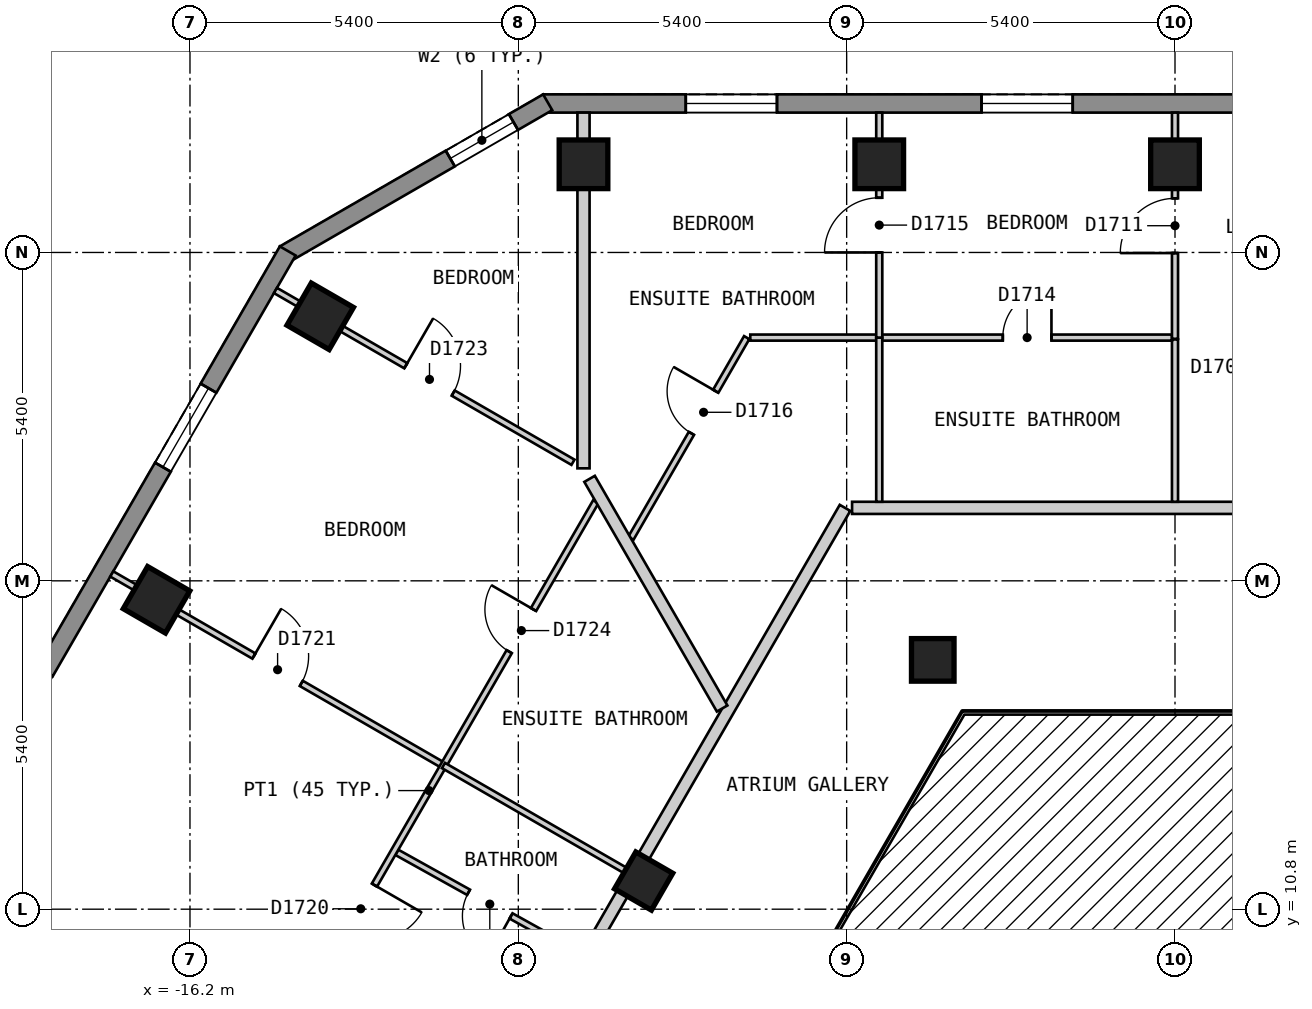
"""IFC4 building model, lengths in metres.
Left out: names, types, materials, properties, quantities, classifications, styles, units other than length and angle.
Written with IfcOpenShell. Run it as: python <this file> out.ifc"""

import sys

from ifc_helpers import new_model, si_unit, direction, frame, frame_2d, origin, origin_2d, place, context, subcontext, project, spatial, polyline, rectangle, outline, extrude, element, fill, save


model = new_model("IFC4")
c1 = context("Model", 3, precision=1e-05, world=origin(), true_north=direction((0.0, 1.0)))
c2 = subcontext(c1, "Body", "Model", "MODEL_VIEW")
j1 = project(units=[si_unit("LENGTHUNIT", "METRE"), si_unit("PLANEANGLEUNIT", "RADIAN")], contexts=[c1])
p1 = place(None, origin())
s1 = spatial("IfcSite", under=j1, at=p1, CompositionType="ELEMENT")
p2 = place(p1, origin())
s2 = spatial("IfcBuilding", under=s1, at=p2, CompositionType="ELEMENT")
p3 = place(p2, frame((0.0, 0.0, 181.2)))
s3 = spatial("IfcBuildingStorey", under=s2, at=p3, CompositionType="ELEMENT", Elevation=181.2)
for number, where, z_axis, x_axis in (
    (1, (0.0, 23.05, 0.0), (0.0, 0.0, 1.0), (-1.0, 0.0, 0.0)),
    (2, (-4.864, 23.05, 0.0), (0.0, 0.0, 1.0), (-1.0, 0.0, 0.0)),
    (3, (-9.728, 23.05, 0.0), (0.0, 0.0, 1.0), (-1.0, 0.0, 0.0)),
    (4, (-14.058, 20.55, 0.0), (0.0, 0.0, 1.0), (-0.5, -0.866, 0.0)),
    (5, (-16.75, 15.888, 0.0), (0.0, 0.0, 1.0), (-0.5, -0.866, 0.0)),
):
    element("IfcColumn", number, at=place(p3, frame(where, z_axis=z_axis, x_axis=x_axis)), inside=s3, PredefinedType="COLUMN", context=c2, shape_type="SweptSolid", body=[
        extrude(rectangle(XDim=0.8, YDim=0.8, at=origin_2d()), origin(), (0.0, 0.0, 1.0), 3.0),
    ])
for number, where, z_axis, x_axis in (
    (6, (-3.984, 14.9, 0.0), (0.0, 0.0, 1.0), (1.0, 0.0, 0.0)),
    (7, (-8.739, 11.263, 0.0), (0.0, 0.0, 1.0), (-0.5, -0.866, 0.0)),
):
    element("IfcColumn", number, at=place(p3, frame(where, z_axis=z_axis, x_axis=x_axis)), inside=s3, PredefinedType="COLUMN", context=c2, shape_type="SweptSolid", body=[
        extrude(rectangle(XDim=0.7, YDim=0.7, at=origin_2d()), origin(), (0.0, 0.0, 1.0), 3.0),
    ])
p4 = place(p3, frame((10.392, 24.05, 0.0), z_axis=(0.0, 0.0, 1.0), x_axis=(-1.0, 0.0, 0.0)))
e8 = element("IfcWall", 8, at=p4, inside=s3, PredefinedType="SOLIDWALL", context=c2, shape_type="SweptSolid", body=[
    extrude(outline(polyline([(0.0, -0.15), (20.784, -0.15), (20.704, 0.15), (0.08, 0.15), (0.0, -0.15)])), origin(), (0.0, 0.0, 1.0), 2.7),
])
p5 = place(p4, frame((2.346, 0.0, 0.15)))
e9 = element("IfcOpeningElement", 9, at=p5, cuts=e8, PredefinedType="OPENING", context=c2, shape_type="SweptSolid", body=[
    extrude(rectangle(XDim=1.5, YDim=2.1, at=frame_2d((0.75, 1.05))), frame((0.0, 0.16, 0.0), z_axis=(0.0, -1.0, 0.0), x_axis=(1.0, 0.0, 0.0)), (0.0, 0.0, 1.0), 0.32),
])
p6 = place(p4, frame((7.21, 0.0, 0.15)))
e10 = element("IfcOpeningElement", 10, at=p6, cuts=e8, PredefinedType="OPENING", context=c2, shape_type="SweptSolid", body=[
    extrude(rectangle(XDim=1.5, YDim=2.1, at=frame_2d((0.75, 1.05))), frame((0.0, 0.16, 0.0), z_axis=(0.0, -1.0, 0.0), x_axis=(1.0, 0.0, 0.0)), (0.0, 0.0, 1.0), 0.32),
])
p7 = place(p4, frame((12.074, 0.0, 0.15)))
e11 = element("IfcOpeningElement", 11, at=p7, cuts=e8, PredefinedType="OPENING", context=c2, shape_type="SweptSolid", body=[
    extrude(rectangle(XDim=1.5, YDim=2.1, at=frame_2d((0.75, 1.05))), frame((0.0, 0.16, 0.0), z_axis=(0.0, -1.0, 0.0), x_axis=(1.0, 0.0, 0.0)), (0.0, 0.0, 1.0), 0.32),
])
p8 = place(p4, frame((16.938, 0.0, 0.15)))
e12 = element("IfcOpeningElement", 12, at=p8, cuts=e8, PredefinedType="OPENING", context=c2, shape_type="SweptSolid", body=[
    extrude(rectangle(XDim=1.5, YDim=2.1, at=frame_2d((0.75, 1.05))), frame((0.0, 0.16, 0.0), z_axis=(0.0, -1.0, 0.0), x_axis=(1.0, 0.0, 0.0)), (0.0, 0.0, 1.0), 0.32),
])
p9 = place(p3, frame((-10.317, 24.07, 0.0), z_axis=(0.0, 0.0, 1.0), x_axis=(-0.866022959057, -0.500004234368, 0.0)))
e13 = element("IfcWall", 13, at=p9, inside=s3, PredefinedType="SOLIDWALL", context=c2, shape_type="SweptSolid", body=[
    extrude(outline(polyline([(0.0, -0.15), (5.0, -0.15), (4.92, 0.15), (0.08, 0.15), (0.0, -0.15)])), origin(), (0.0, 0.0, 1.0), 2.7),
])
p10 = place(p9, frame((0.65, 0.0, 0.15)))
e14 = element("IfcOpeningElement", 14, at=p10, cuts=e13, PredefinedType="OPENING", context=c2, shape_type="SweptSolid", body=[
    extrude(rectangle(XDim=1.2, YDim=2.1, at=frame_2d((0.6, 1.05))), frame((0.0, 0.16, 0.0), z_axis=(0.0, -1.0, 0.0), x_axis=(1.0, 0.0, 0.0)), (0.0, 0.0, 1.0), 0.32),
])
p11 = place(p3, frame((-14.592, 21.625, 0.0), z_axis=(0.0, 0.0, 1.0), x_axis=(-0.500010537973, -0.866019319597, 0.0)))
e15 = element("IfcWall", 15, at=p11, inside=s3, PredefinedType="SOLIDWALL", context=c2, shape_type="SweptSolid", body=[
    extrude(outline(polyline([(0.0, -0.15), (22.863, -0.15), (22.783, 0.15), (0.08, 0.15), (0.0, -0.15)])), origin(), (0.0, 0.0, 1.0), 2.7),
])
p12 = place(p11, frame((2.606, 0.0, 0.15)))
e16 = element("IfcOpeningElement", 16, at=p12, cuts=e15, PredefinedType="OPENING", context=c2, shape_type="SweptSolid", body=[
    extrude(rectangle(XDim=1.5, YDim=2.1, at=frame_2d((0.75, 1.05))), frame((0.0, 0.16, 0.0), z_axis=(0.0, -1.0, 0.0), x_axis=(1.0, 0.0, 0.0)), (0.0, 0.0, 1.0), 0.32),
])
p13 = place(p11, frame((7.99, 0.0, 0.15)))
e17 = element("IfcOpeningElement", 17, at=p13, cuts=e15, PredefinedType="OPENING", context=c2, shape_type="SweptSolid", body=[
    extrude(rectangle(XDim=1.5, YDim=2.1, at=frame_2d((0.75, 1.05))), frame((0.0, 0.16, 0.0), z_axis=(0.0, -1.0, 0.0), x_axis=(1.0, 0.0, 0.0)), (0.0, 0.0, 1.0), 0.32),
])
p14 = place(p11, frame((13.373, 0.0, 0.15)))
e18 = element("IfcOpeningElement", 18, at=p14, cuts=e15, PredefinedType="OPENING", context=c2, shape_type="SweptSolid", body=[
    extrude(rectangle(XDim=1.5, YDim=2.1, at=frame_2d((0.75, 1.05))), frame((0.0, 0.16, 0.0), z_axis=(0.0, -1.0, 0.0), x_axis=(1.0, 0.0, 0.0)), (0.0, 0.0, 1.0), 0.32),
])
p15 = place(p11, frame((18.758, 0.0, 0.15)))
e19 = element("IfcOpeningElement", 19, at=p15, cuts=e15, PredefinedType="OPENING", context=c2, shape_type="SweptSolid", body=[
    extrude(rectangle(XDim=1.5, YDim=2.1, at=frame_2d((0.75, 1.05))), frame((0.0, 0.16, 0.0), z_axis=(0.0, -1.0, 0.0), x_axis=(1.0, 0.0, 0.0)), (0.0, 0.0, 1.0), 0.32),
])
p16 = place(p3, frame((-5.311, 17.4, 0.0), z_axis=(0.0, 0.0, 1.0), x_axis=(1.0, 0.0, 0.0)))
e20 = element("IfcWall", 20, at=p16, inside=s3, PredefinedType="PARTITIONING", context=c2, shape_type="SweptSolid", body=[
    extrude(rectangle(XDim=10.737, YDim=0.2, at=frame_2d((5.369, 0.0))), origin(), (0.0, 0.0, 1.0), 2.7),
])
p17 = place(p16, frame((7.243, 0.0, 0.0)))
e21 = element("IfcOpeningElement", 21, at=p17, cuts=e20, PredefinedType="OPENING", context=c2, shape_type="SweptSolid", body=[
    extrude(rectangle(XDim=0.9, YDim=2.1, at=frame_2d((0.45, 1.05))), frame((0.0, 0.11, 0.0), z_axis=(0.0, -1.0, 0.0), x_axis=(1.0, 0.0, 0.0)), (0.0, 0.0, 1.0), 0.22),
])
p18 = place(p3, frame((-10.771, 8.145, 0.0), z_axis=(0.0, 0.0, 1.0), x_axis=(0.500048075867, 0.865997645391, 0.0)))
e22 = element("IfcWall", 22, at=p18, inside=s3, PredefinedType="PARTITIONING", context=c2, shape_type="SweptSolid", body=[
    extrude(rectangle(XDim=10.687, YDim=0.2, at=frame_2d((5.344, 0.0))), origin(), (0.0, 0.0, 1.0), 2.7),
])
p19 = place(p18, frame((0.549, 0.0, 0.0)))
e23 = element("IfcOpeningElement", 23, at=p19, cuts=e22, PredefinedType="OPENING", context=c2, shape_type="SweptSolid", body=[
    extrude(rectangle(XDim=1.0, YDim=2.1, at=frame_2d((0.5, 1.05))), frame((0.0, 0.11, 0.0), z_axis=(0.0, -1.0, 0.0), x_axis=(1.0, 0.0, 0.0)), (0.0, 0.0, 1.0), 0.22),
])
p20 = place(p3, frame((0.0, 20.17, 0.0), z_axis=(0.0, 0.0, 1.0), x_axis=(0.0, -1.0, 0.0)))
e24 = element("IfcWall", 24, at=p20, inside=s3, PredefinedType="PARTITIONING", context=c2, shape_type="SweptSolid", body=[
    extrude(rectangle(XDim=2.67, YDim=0.1, at=frame_2d((1.335, 0.0))), origin(), (0.0, 0.0, 1.0), 2.7),
])
p21 = place(p3, frame((-12.798, 11.735, 0.0), z_axis=(0.0, 0.0, 1.0), x_axis=(0.873649600774, -0.486555623816, 0.0)))
e25 = element("IfcWall", 25, at=p21, inside=s3, PredefinedType="PARTITIONING", context=c2, shape_type="SweptSolid", body=[
    extrude(rectangle(XDim=3.451, YDim=0.1, at=frame_2d((1.726, 0.0))), origin(), (0.0, 0.0, 1.0), 2.7),
])
p22 = place(p21, frame((1.35, 0.0, 0.0)))
e26 = element("IfcOpeningElement", 26, at=p22, cuts=e25, PredefinedType="OPENING", context=c2, shape_type="SweptSolid", body=[
    extrude(rectangle(XDim=0.8, YDim=2.1, at=frame_2d((0.4, 1.05))), frame((0.0, 0.06, 0.0), z_axis=(0.0, -1.0, 0.0), x_axis=(1.0, 0.0, 0.0)), (0.0, 0.0, 1.0), 0.12),
])
p23 = place(p3, frame((-17.486, 16.313, 0.0), z_axis=(0.0, 0.0, 1.0), x_axis=(0.865997114097, -0.500048995975, 0.0)))
e27 = element("IfcWall", 27, at=p23, inside=s3, PredefinedType="PARTITIONING", context=c2, shape_type="SweptSolid", body=[
    extrude(rectangle(XDim=6.299, YDim=0.1, at=frame_2d((3.149, 0.0))), origin(), (0.0, 0.0, 1.0), 2.7),
])
p24 = place(p23, frame((2.699, 0.0, 0.0)))
e28 = element("IfcOpeningElement", 28, at=p24, cuts=e27, PredefinedType="OPENING", context=c2, shape_type="SweptSolid", body=[
    extrude(rectangle(XDim=0.9, YDim=2.1, at=frame_2d((0.45, 1.05))), frame((0.0, 0.06, 0.0), z_axis=(0.0, -1.0, 0.0), x_axis=(1.0, 0.0, 0.0)), (0.0, 0.0, 1.0), 0.12),
])
p25 = place(p3, frame((-14.794, 20.975, 0.0), z_axis=(0.0, 0.0, 1.0), x_axis=(0.866011447264, -0.500024172624, 0.0)))
e29 = element("IfcWall", 29, at=p25, inside=s3, PredefinedType="PARTITIONING", context=c2, shape_type="SweptSolid", body=[
    extrude(rectangle(XDim=5.65, YDim=0.1, at=frame_2d((2.825, 0.0))), origin(), (0.0, 0.0, 1.0), 2.7),
])
p26 = place(p25, frame((2.475, 0.0, 0.0)))
e30 = element("IfcOpeningElement", 30, at=p26, cuts=e29, PredefinedType="OPENING", context=c2, shape_type="SweptSolid", body=[
    extrude(rectangle(XDim=0.9, YDim=2.1, at=frame_2d((0.45, 1.05))), frame((0.0, 0.06, 0.0), z_axis=(0.0, -1.0, 0.0), x_axis=(1.0, 0.0, 0.0)), (0.0, 0.0, 1.0), 0.12),
])
p27 = place(p3, frame((-6.985, 20.2, 0.0), z_axis=(0.0, 0.0, 1.0), x_axis=(1.0, 0.0, 0.0)))
e31 = element("IfcWall", 31, at=p27, inside=s3, PredefinedType="PARTITIONING", context=c2, shape_type="SweptSolid", body=[
    extrude(rectangle(XDim=6.935, YDim=0.1, at=frame_2d((3.468, 0.0))), origin(), (0.0, 0.0, 1.0), 2.7),
])
p28 = place(p27, frame((4.153, 0.0, 0.0)))
e32 = element("IfcOpeningElement", 32, at=p28, cuts=e31, PredefinedType="OPENING", context=c2, shape_type="SweptSolid", body=[
    extrude(rectangle(XDim=0.8, YDim=2.1, at=frame_2d((0.4, 1.05))), frame((0.0, 0.06, 0.0), z_axis=(0.0, -1.0, 0.0), x_axis=(1.0, 0.0, 0.0)), (0.0, 0.0, 1.0), 0.12),
])
p29 = place(p3, frame((-8.949, 16.9, 0.0), z_axis=(0.0, 0.0, 1.0), x_axis=(0.499949850951, 0.866054355415, 0.0)))
e33 = element("IfcWall", 33, at=p29, inside=s3, PredefinedType="PARTITIONING", context=c2, shape_type="SweptSolid", body=[
    extrude(rectangle(XDim=3.811, YDim=0.1, at=frame_2d((1.905, 0.0))), origin(), (0.0, 0.0, 1.0), 2.7),
])
p30 = place(p29, frame((1.992, 0.0, 0.0)))
e34 = element("IfcOpeningElement", 34, at=p30, cuts=e33, PredefinedType="OPENING", context=c2, shape_type="SweptSolid", body=[
    extrude(rectangle(XDim=0.8, YDim=2.1, at=frame_2d((0.4, 1.05))), frame((0.0, 0.06, 0.0), z_axis=(0.0, -1.0, 0.0), x_axis=(1.0, 0.0, 0.0)), (0.0, 0.0, 1.0), 0.12),
])
p31 = place(p3, frame((-15.012, 8.0, 0.0), z_axis=(0.0, 0.0, 1.0), x_axis=(0.500047346826, 0.865998066356, 0.0)))
e35 = element("IfcWall", 35, at=p31, inside=s3, PredefinedType="PARTITIONING", context=c2, shape_type="SweptSolid", body=[
    extrude(rectangle(XDim=10.971, YDim=0.1, at=frame_2d((5.486, 0.0))), origin(), (0.0, 0.0, 1.0), 2.7),
])
p32 = place(p31, frame((2.791, 0.0, 0.0)))
e36 = element("IfcOpeningElement", 36, at=p32, cuts=e35, PredefinedType="OPENING", context=c2, shape_type="SweptSolid", body=[
    extrude(rectangle(XDim=0.9, YDim=2.1, at=frame_2d((0.45, 1.05))), frame((0.0, 0.06, 0.0), z_axis=(0.0, -1.0, 0.0), x_axis=(1.0, 0.0, 0.0)), (0.0, 0.0, 1.0), 0.12),
])
p33 = place(p31, frame((8.124, 0.0, 0.0)))
e37 = element("IfcOpeningElement", 37, at=p33, cuts=e35, PredefinedType="OPENING", context=c2, shape_type="SweptSolid", body=[
    extrude(rectangle(XDim=0.8, YDim=2.1, at=frame_2d((0.4, 1.05))), frame((0.0, 0.06, 0.0), z_axis=(0.0, -1.0, 0.0), x_axis=(1.0, 0.0, 0.0)), (0.0, 0.0, 1.0), 0.12),
])
p34 = place(p3, frame((0.0, 20.18, 0.0), z_axis=(0.0, 0.0, 1.0), x_axis=(0.0, 1.0, 0.0)))
e38 = element("IfcWall", 38, at=p34, inside=s3, PredefinedType="PARTITIONING", context=c2, shape_type="SweptSolid", body=[
    extrude(rectangle(XDim=3.72, YDim=0.1, at=frame_2d((1.86, 0.0))), origin(), (0.0, 0.0, 1.0), 2.7),
])
p35 = place(p34, frame((1.41, 0.0, 0.0)))
e39 = element("IfcOpeningElement", 39, at=p35, cuts=e38, PredefinedType="OPENING", context=c2, shape_type="SweptSolid", body=[
    extrude(rectangle(XDim=0.9, YDim=2.1, at=frame_2d((0.45, 1.05))), frame((0.0, 0.06, 0.0), z_axis=(0.0, -1.0, 0.0), x_axis=(1.0, 0.0, 0.0)), (0.0, 0.0, 1.0), 0.12),
])
p36 = place(p3, frame((-4.864, 17.5, 0.0), z_axis=(0.0, 0.0, 1.0), x_axis=(0.0, 1.0, 0.0)))
e40 = element("IfcWall", 40, at=p36, inside=s3, PredefinedType="PARTITIONING", context=c2, shape_type="SweptSolid", body=[
    extrude(rectangle(XDim=2.7, YDim=0.1, at=frame_2d((1.35, 0.0))), origin(), (0.0, 0.0, 1.0), 2.7),
])
p37 = place(p3, frame((-9.628, 17.877, 0.0), z_axis=(0.0, 0.0, 1.0), x_axis=(0.499890461358, -0.866088636713, 0.0)))
e41 = element("IfcWall", 41, at=p37, inside=s3, PredefinedType="PARTITIONING", context=c2, shape_type="SweptSolid", body=[
    extrude(rectangle(XDim=4.361, YDim=0.2, at=frame_2d((2.18, 0.0))), origin(), (0.0, 0.0, 1.0), 2.7),
])
p38 = place(p3, frame((-9.728, 18.05, 0.0), z_axis=(0.0, 0.0, 1.0), x_axis=(0.0, 1.0, 0.0)))
e42 = element("IfcWall", 42, at=p38, inside=s3, PredefinedType="PARTITIONING", context=c2, shape_type="SweptSolid", body=[
    extrude(rectangle(XDim=5.85, YDim=0.2, at=frame_2d((2.925, 0.0))), origin(), (0.0, 0.0, 1.0), 2.7),
])
p39 = place(p3, frame((-12.031, 13.163, 0.0), z_axis=(0.0, 0.0, 1.0), x_axis=(0.86608920467, -0.499889477339, 0.0)))
e43 = element("IfcWall", 43, at=p39, inside=s3, PredefinedType="PARTITIONING", context=c2, shape_type="SweptSolid", body=[
    extrude(rectangle(XDim=3.501, YDim=0.1, at=frame_2d((1.75, 0.0))), origin(), (0.0, 0.0, 1.0), 2.7),
])
p40 = place(p3, frame((-4.864, 20.2, 0.0), z_axis=(0.0, 0.0, 1.0), x_axis=(0.0, 1.0, 0.0)))
e44 = element("IfcWall", 44, at=p40, inside=s3, PredefinedType="PARTITIONING", context=c2, shape_type="SweptSolid", body=[
    extrude(rectangle(XDim=3.7, YDim=0.1, at=frame_2d((1.85, 0.0))), origin(), (0.0, 0.0, 1.0), 2.7),
])
p41 = place(p40, frame((1.4, 0.0, 0.0)))
e45 = element("IfcOpeningElement", 45, at=p41, cuts=e44, PredefinedType="OPENING", context=c2, shape_type="SweptSolid", body=[
    extrude(rectangle(XDim=0.9, YDim=2.1, at=frame_2d((0.45, 1.05))), frame((0.0, 0.06, 0.0), z_axis=(0.0, -1.0, 0.0), x_axis=(1.0, 0.0, 0.0)), (0.0, 0.0, 1.0), 0.12),
])
p42 = place(p7, origin())
e46 = element("IfcWindow", 46, at=p42, inside=s3, PartitioningType="SINGLE_PANEL", PredefinedType="WINDOW", context=c2, shape_type="SweptSolid", body=[
    extrude(rectangle(XDim=1.5, YDim=2.1, at=frame_2d((0.75, 1.05))), frame((0.0, 0.03, 0.0), z_axis=(0.0, -1.0, 0.0), x_axis=(1.0, 0.0, 0.0)), (0.0, 0.0, 1.0), 0.06),
])
fill(e11, e46)
p43 = place(p8, origin())
e47 = element("IfcWindow", 47, at=p43, inside=s3, PartitioningType="SINGLE_PANEL", PredefinedType="WINDOW", context=c2, shape_type="SweptSolid", body=[
    extrude(rectangle(XDim=1.5, YDim=2.1, at=frame_2d((0.75, 1.05))), frame((0.0, 0.03, 0.0), z_axis=(0.0, -1.0, 0.0), x_axis=(1.0, 0.0, 0.0)), (0.0, 0.0, 1.0), 0.06),
])
fill(e12, e47)
p44 = place(p10, origin())
e48 = element("IfcWindow", 48, at=p44, inside=s3, PartitioningType="SINGLE_PANEL", PredefinedType="WINDOW", context=c2, shape_type="SweptSolid", body=[
    extrude(rectangle(XDim=1.2, YDim=2.1, at=frame_2d((0.6, 1.05))), frame((0.0, 0.03, 0.0), z_axis=(0.0, -1.0, 0.0), x_axis=(1.0, 0.0, 0.0)), (0.0, 0.0, 1.0), 0.06),
])
fill(e14, e48)
p45 = place(p12, origin())
e49 = element("IfcWindow", 49, at=p45, inside=s3, PartitioningType="SINGLE_PANEL", PredefinedType="WINDOW", context=c2, shape_type="SweptSolid", body=[
    extrude(rectangle(XDim=1.5, YDim=2.1, at=frame_2d((0.75, 1.05))), frame((0.0, 0.03, 0.0), z_axis=(0.0, -1.0, 0.0), x_axis=(1.0, 0.0, 0.0)), (0.0, 0.0, 1.0), 0.06),
])
fill(e16, e49)
p46 = place(p35, origin())
e50 = element("IfcDoor", 50, at=p46, inside=s3, OperationType="SINGLE_SWING_LEFT", PredefinedType="DOOR", context=c2, shape_type="SweptSolid", body=[
    extrude(rectangle(XDim=0.9, YDim=2.1, at=frame_2d((0.45, 1.05))), frame((0.0, 0.025, 0.0), z_axis=(0.0, -1.0, 0.0), x_axis=(1.0, 0.0, 0.0)), (0.0, 0.0, 1.0), 0.05),
])
fill(e39, e50)
p47 = place(p28, origin())
e51 = element("IfcDoor", 51, at=p47, inside=s3, OperationType="SINGLE_SWING_RIGHT", PredefinedType="DOOR", context=c2, shape_type="SweptSolid", body=[
    extrude(rectangle(XDim=0.8, YDim=2.1, at=frame_2d((0.4, 1.05))), frame((0.0, 0.025, 0.0), z_axis=(0.0, -1.0, 0.0), x_axis=(1.0, 0.0, 0.0)), (0.0, 0.0, 1.0), 0.05),
])
fill(e32, e51)
p48 = place(p41, origin())
e52 = element("IfcDoor", 52, at=p48, inside=s3, OperationType="SINGLE_SWING_LEFT", PredefinedType="DOOR", context=c2, shape_type="SweptSolid", body=[
    extrude(rectangle(XDim=0.9, YDim=2.1, at=frame_2d((0.45, 1.05))), frame((0.0, 0.025, 0.0), z_axis=(0.0, -1.0, 0.0), x_axis=(1.0, 0.0, 0.0)), (0.0, 0.0, 1.0), 0.05),
])
fill(e45, e52)
p49 = place(p30, origin())
e53 = element("IfcDoor", 53, at=p49, inside=s3, OperationType="SINGLE_SWING_RIGHT", PredefinedType="DOOR", context=c2, shape_type="SweptSolid", body=[
    extrude(rectangle(XDim=0.8, YDim=2.1, at=frame_2d((0.4, 1.05))), frame((0.0, 0.025, 0.0), z_axis=(0.0, -1.0, 0.0), x_axis=(1.0, 0.0, 0.0)), (0.0, 0.0, 1.0), 0.05),
])
fill(e34, e53)
p50 = place(p22, origin())
e54 = element("IfcDoor", 54, at=p50, inside=s3, OperationType="SINGLE_SWING_RIGHT", PredefinedType="DOOR", context=c2, shape_type="SweptSolid", body=[
    extrude(rectangle(XDim=0.8, YDim=2.1, at=frame_2d((0.4, 1.05))), frame((0.0, 0.025, 0.0), z_axis=(0.0, -1.0, 0.0), x_axis=(1.0, 0.0, 0.0)), (0.0, 0.0, 1.0), 0.05),
])
fill(e26, e54)
p51 = place(p32, origin())
e55 = element("IfcDoor", 55, at=p51, inside=s3, OperationType="SINGLE_SWING_RIGHT", PredefinedType="DOOR", context=c2, shape_type="SweptSolid", body=[
    extrude(rectangle(XDim=0.9, YDim=2.1, at=frame_2d((0.45, 1.05))), frame((0.0, 0.025, 0.0), z_axis=(0.0, -1.0, 0.0), x_axis=(1.0, 0.0, 0.0)), (0.0, 0.0, 1.0), 0.05),
])
fill(e36, e55)
p52 = place(p24, origin())
e56 = element("IfcDoor", 56, at=p52, inside=s3, OperationType="SINGLE_SWING_LEFT", PredefinedType="DOOR", context=c2, shape_type="SweptSolid", body=[
    extrude(rectangle(XDim=0.9, YDim=2.1, at=frame_2d((0.45, 1.05))), frame((0.0, 0.025, 0.0), z_axis=(0.0, -1.0, 0.0), x_axis=(1.0, 0.0, 0.0)), (0.0, 0.0, 1.0), 0.05),
])
fill(e28, e56)
p53 = place(p26, origin())
e57 = element("IfcDoor", 57, at=p53, inside=s3, OperationType="SINGLE_SWING_LEFT", PredefinedType="DOOR", context=c2, shape_type="SweptSolid", body=[
    extrude(rectangle(XDim=0.9, YDim=2.1, at=frame_2d((0.45, 1.05))), frame((0.0, 0.025, 0.0), z_axis=(0.0, -1.0, 0.0), x_axis=(1.0, 0.0, 0.0)), (0.0, 0.0, 1.0), 0.05),
])
fill(e30, e57)
p54 = place(p33, origin())
e58 = element("IfcDoor", 58, at=p54, inside=s3, OperationType="SINGLE_SWING_RIGHT", PredefinedType="DOOR", context=c2, shape_type="SweptSolid", body=[
    extrude(rectangle(XDim=0.8, YDim=2.1, at=frame_2d((0.4, 1.05))), frame((0.0, 0.025, 0.0), z_axis=(0.0, -1.0, 0.0), x_axis=(1.0, 0.0, 0.0)), (0.0, 0.0, 1.0), 0.05),
])
fill(e37, e58)
save(model, sys.argv[1])
